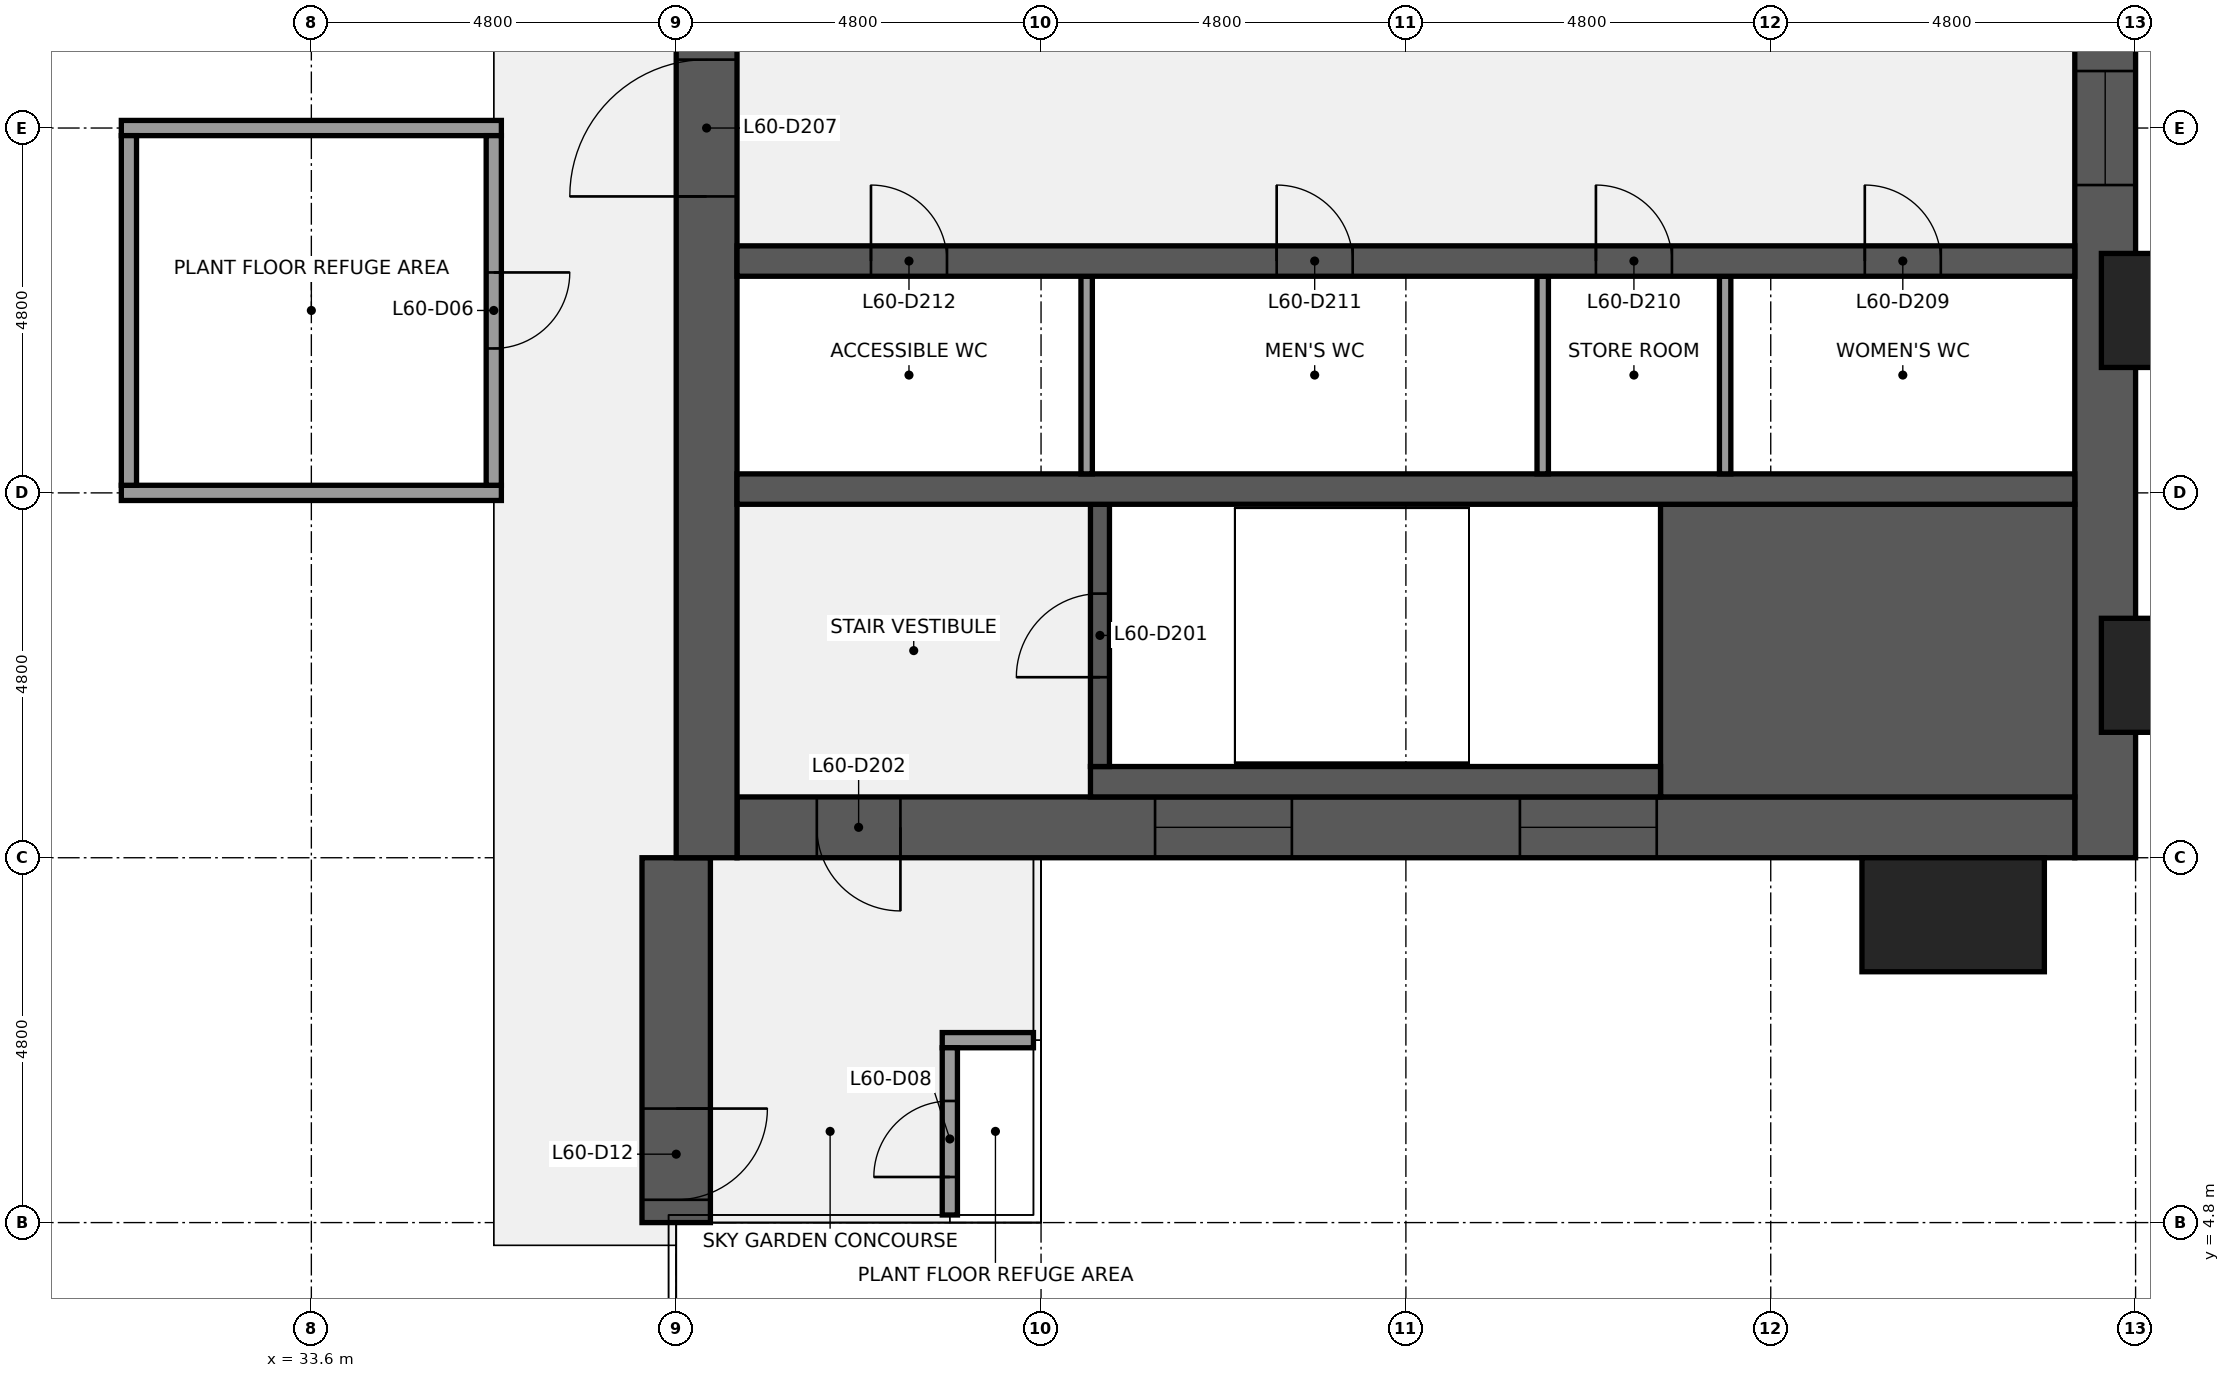
"""IFC4 building model, lengths in metres.
Left out: names, types, materials, properties, quantities, classifications, styles, units other than length and angle.
Written with IfcOpenShell. Run it as: python <this file> out.ifc"""

import sys

from ifc_helpers import new_model, si_unit, direction, frame, frame_2d, origin, origin_2d, place, context, subcontext, project, spatial, rectangle, extrude, element, fill, save


model = new_model("IFC4")
c1 = context("Model", 3, precision=1e-05, world=origin(), true_north=direction((0.0, 1.0)))
c2 = subcontext(c1, "Body", "Model", "MODEL_VIEW")
j1 = project(units=[si_unit("LENGTHUNIT", "METRE"), si_unit("PLANEANGLEUNIT", "RADIAN")], contexts=[c1])
p1 = place(None, origin())
s1 = spatial("IfcSite", under=j1, at=p1, CompositionType="ELEMENT")
p2 = place(p1, origin())
s2 = spatial("IfcBuilding", under=s1, at=p2, CompositionType="ELEMENT")
p3 = place(p2, frame((0.0, 0.0, 269.7)))
s3 = spatial("IfcBuildingStorey", under=s2, at=p3, CompositionType="ELEMENT", Elevation=269.7)
p4 = place(p3, frame((38.4, 4.8, 0.0), z_axis=(0.0, 0.0, 1.0), x_axis=(0.0, 1.0, 0.0)))
e1 = element("IfcWall", 1, at=p4, inside=s3, PredefinedType="SHEAR", context=c2, shape_type="SweptSolid", body=[
    extrude(rectangle(XDim=4.8, YDim=0.9, at=frame_2d((2.4, 0.0))), origin(), (0.0, 0.0, 1.0), 12.3),
])
p5 = place(p4, frame((0.3, 0.0, 0.0)))
e2 = element("IfcOpeningElement", 2, at=p5, cuts=e1, PredefinedType="OPENING", context=c2, shape_type="SweptSolid", body=[
    extrude(rectangle(XDim=1.2, YDim=2.1, at=frame_2d((0.6, 1.05))), frame((0.0, 0.46, 0.0), z_axis=(0.0, -1.0, 0.0), x_axis=(1.0, 0.0, 0.0)), (0.0, 0.0, 1.0), 0.92),
])
p6 = place(p3, frame((57.2, 38.4, 0.0), z_axis=(0.0, 0.0, 1.0), x_axis=(0.0, -1.0, 0.0)))
e3 = element("IfcWall", 3, at=p6, inside=s3, PredefinedType="SHEAR", context=c2, shape_type="SweptSolid", body=[
    extrude(rectangle(XDim=28.8, YDim=0.8, at=frame_2d((14.4, 0.0))), origin(), (0.0, 0.0, 1.0), 12.3),
])
p7 = place(p6, frame((18.45, 0.0, 0.9)))
e4 = element("IfcOpeningElement", 4, at=p7, cuts=e3, PredefinedType="OPENING", context=c2, shape_type="SweptSolid", body=[
    extrude(rectangle(XDim=1.5, YDim=6.3, at=frame_2d((0.75, 3.15))), frame((0.0, 0.41, 0.0), z_axis=(0.0, -1.0, 0.0), x_axis=(1.0, 0.0, 0.0)), (0.0, 0.0, 1.0), 0.82),
])
p8 = place(p6, frame((8.85, 0.0, 0.9)))
e5 = element("IfcOpeningElement", 5, at=p8, cuts=e3, PredefinedType="OPENING", context=c2, shape_type="SweptSolid", body=[
    extrude(rectangle(XDim=1.5, YDim=6.3, at=frame_2d((0.75, 3.15))), frame((0.0, 0.41, 0.0), z_axis=(0.0, -1.0, 0.0), x_axis=(1.0, 0.0, 0.0)), (0.0, 0.0, 1.0), 0.82),
])
p9 = place(p3, frame((56.8, 10.0, 0.0), z_axis=(0.0, 0.0, 1.0), x_axis=(-1.0, 0.0, 0.0)))
e6 = element("IfcWall", 6, at=p9, inside=s3, PredefinedType="SHEAR", context=c2, shape_type="SweptSolid", body=[
    extrude(rectangle(XDim=17.6, YDim=0.8, at=frame_2d((8.8, 0.0))), origin(), (0.0, 0.0, 1.0), 12.3),
])
p10 = place(p9, frame((15.45, 0.0, 0.0)))
e7 = element("IfcOpeningElement", 7, at=p10, cuts=e6, PredefinedType="OPENING", context=c2, shape_type="SweptSolid", body=[
    extrude(rectangle(XDim=1.1, YDim=2.1, at=frame_2d((0.55, 1.05))), frame((0.0, 0.41, 0.0), z_axis=(0.0, -1.0, 0.0), x_axis=(1.0, 0.0, 0.0)), (0.0, 0.0, 1.0), 0.82),
])
p11 = place(p9, frame((5.5, 0.0, 0.9)))
e8 = element("IfcOpeningElement", 8, at=p11, cuts=e6, PredefinedType="OPENING", context=c2, shape_type="SweptSolid", body=[
    extrude(rectangle(XDim=1.8, YDim=1.5, at=frame_2d((0.9, 0.75))), frame((0.0, 0.41, 0.0), z_axis=(0.0, -1.0, 0.0), x_axis=(1.0, 0.0, 0.0)), (0.0, 0.0, 1.0), 0.82),
])
p12 = place(p9, frame((10.3, 0.0, 0.9)))
e9 = element("IfcOpeningElement", 9, at=p12, cuts=e6, PredefinedType="OPENING", context=c2, shape_type="SweptSolid", body=[
    extrude(rectangle(XDim=1.8, YDim=1.5, at=frame_2d((0.9, 0.75))), frame((0.0, 0.41, 0.0), z_axis=(0.0, -1.0, 0.0), x_axis=(1.0, 0.0, 0.0)), (0.0, 0.0, 1.0), 0.82),
])
p13 = place(p3, frame((38.8, 9.6, 0.0), z_axis=(0.0, 0.0, 1.0), x_axis=(0.0, 1.0, 0.0)))
e10 = element("IfcWall", 10, at=p13, inside=s3, PredefinedType="SHEAR", context=c2, shape_type="SweptSolid", body=[
    extrude(rectangle(XDim=28.8, YDim=0.8, at=frame_2d((14.4, 0.0))), origin(), (0.0, 0.0, 1.0), 12.3),
])
p14 = place(p13, frame((8.7, 0.0, 0.0)))
e11 = element("IfcOpeningElement", 11, at=p14, cuts=e10, PredefinedType="OPENING", context=c2, shape_type="SweptSolid", body=[
    extrude(rectangle(XDim=1.8, YDim=2.1, at=frame_2d((0.9, 1.05))), frame((0.0, 0.41, 0.0), z_axis=(0.0, -1.0, 0.0), x_axis=(1.0, 0.0, 0.0)), (0.0, 0.0, 1.0), 0.82),
])
p15 = place(p13, frame((18.3, 0.0, 0.0)))
e12 = element("IfcOpeningElement", 12, at=p15, cuts=e10, PredefinedType="OPENING", context=c2, shape_type="SweptSolid", body=[
    extrude(rectangle(XDim=1.8, YDim=2.1, at=frame_2d((0.9, 1.05))), frame((0.0, 0.41, 0.0), z_axis=(0.0, -1.0, 0.0), x_axis=(1.0, 0.0, 0.0)), (0.0, 0.0, 1.0), 0.82),
])
p16 = place(p3, frame((51.35, 12.325, 0.0), z_axis=(0.0, 0.0, 1.0), x_axis=(1.0, 0.0, 0.0)))
e13 = element("IfcWall", 13, at=p16, inside=s3, PredefinedType="SHEAR", context=c2, shape_type="SweptSolid", body=[
    extrude(rectangle(XDim=5.45, YDim=3.85, at=frame_2d((2.725, 0.0))), origin(), (0.0, 0.0, 1.0), 12.3),
])
p17 = place(p3, frame((43.85, 10.6, 0.0), z_axis=(0.0, 0.0, 1.0), x_axis=(1.0, 0.0, 0.0)))
e14 = element("IfcWall", 14, at=p17, inside=s3, PredefinedType="SHEAR", context=c2, shape_type="SweptSolid", body=[
    extrude(rectangle(XDim=7.5, YDim=0.4, at=frame_2d((3.75, 0.0))), origin(), (0.0, 0.0, 1.0), 12.3),
])
p18 = place(p3, frame((43.975, 10.8, 0.0), z_axis=(0.0, 0.0, 1.0), x_axis=(0.0, 1.0, 0.0)))
e15 = element("IfcWall", 15, at=p18, inside=s3, PredefinedType="SHEAR", context=c2, shape_type="SweptSolid", body=[
    extrude(rectangle(XDim=3.45, YDim=0.25, at=frame_2d((1.725, 0.0))), origin(), (0.0, 0.0, 1.0), 12.3),
])
p19 = place(p18, frame((1.175, 0.0, 0.0)))
e16 = element("IfcOpeningElement", 16, at=p19, cuts=e15, PredefinedType="OPENING", context=c2, shape_type="SweptSolid", body=[
    extrude(rectangle(XDim=1.1, YDim=2.1, at=frame_2d((0.55, 1.05))), frame((0.0, 0.135, 0.0), z_axis=(0.0, -1.0, 0.0), x_axis=(1.0, 0.0, 0.0)), (0.0, 0.0, 1.0), 0.27),
])
p20 = place(p3, frame((39.2, 14.45, 0.0), z_axis=(0.0, 0.0, 1.0), x_axis=(1.0, 0.0, 0.0)))
e17 = element("IfcWall", 17, at=p20, inside=s3, PredefinedType="SHEAR", context=c2, shape_type="SweptSolid", body=[
    extrude(rectangle(XDim=17.6, YDim=0.4, at=frame_2d((8.8, 0.0))), origin(), (0.0, 0.0, 1.0), 12.3),
])
for number, where, z_axis, x_axis in (
    (18, (52.2, 14.65, 0.0), (0.0, 0.0, 1.0), (0.0, 1.0, 0.0)),
    (19, (49.8, 14.65, 0.0), (0.0, 0.0, 1.0), (0.0, 1.0, 0.0)),
    (20, (43.8, 14.65, 0.0), (0.0, 0.0, 1.0), (0.0, 1.0, 0.0)),
):
    element("IfcWall", number, at=place(p3, frame(where, z_axis=z_axis, x_axis=x_axis)), inside=s3, PredefinedType="PARTITIONING", context=c2, shape_type="SweptSolid", body=[
        extrude(rectangle(XDim=2.6, YDim=0.15, at=frame_2d((1.3, 0.0))), origin(), (0.0, 0.0, 1.0), 12.3),
    ])
p21 = place(p3, frame((39.2, 17.45, 0.0), z_axis=(0.0, 0.0, 1.0), x_axis=(1.0, 0.0, 0.0)))
e21 = element("IfcWall", 21, at=p21, inside=s3, PredefinedType="SHEAR", context=c2, shape_type="SweptSolid", body=[
    extrude(rectangle(XDim=17.6, YDim=0.4, at=frame_2d((8.8, 0.0))), origin(), (0.0, 0.0, 1.0), 12.3),
])
p22 = place(p21, frame((14.837, 0.0, 0.0)))
e22 = element("IfcOpeningElement", 22, at=p22, cuts=e21, PredefinedType="OPENING", context=c2, shape_type="SweptSolid", body=[
    extrude(rectangle(XDim=1.0, YDim=2.1, at=frame_2d((0.5, 1.05))), frame((0.0, 0.21, 0.0), z_axis=(0.0, -1.0, 0.0), x_axis=(1.0, 0.0, 0.0)), (0.0, 0.0, 1.0), 0.42),
])
p23 = place(p21, frame((11.3, 0.0, 0.0)))
e23 = element("IfcOpeningElement", 23, at=p23, cuts=e21, PredefinedType="OPENING", context=c2, shape_type="SweptSolid", body=[
    extrude(rectangle(XDim=1.0, YDim=2.1, at=frame_2d((0.5, 1.05))), frame((0.0, 0.21, 0.0), z_axis=(0.0, -1.0, 0.0), x_axis=(1.0, 0.0, 0.0)), (0.0, 0.0, 1.0), 0.42),
])
p24 = place(p21, frame((7.1, 0.0, 0.0)))
e24 = element("IfcOpeningElement", 24, at=p24, cuts=e21, PredefinedType="OPENING", context=c2, shape_type="SweptSolid", body=[
    extrude(rectangle(XDim=1.0, YDim=2.1, at=frame_2d((0.5, 1.05))), frame((0.0, 0.21, 0.0), z_axis=(0.0, -1.0, 0.0), x_axis=(1.0, 0.0, 0.0)), (0.0, 0.0, 1.0), 0.42),
])
p25 = place(p21, frame((1.762, 0.0, 0.0)))
e25 = element("IfcOpeningElement", 25, at=p25, cuts=e21, PredefinedType="OPENING", context=c2, shape_type="SweptSolid", body=[
    extrude(rectangle(XDim=1.0, YDim=2.1, at=frame_2d((0.5, 1.05))), frame((0.0, 0.21, 0.0), z_axis=(0.0, -1.0, 0.0), x_axis=(1.0, 0.0, 0.0)), (0.0, 0.0, 1.0), 0.42),
])
p26 = place(p3, frame((41.9, 7.2, 0.0), z_axis=(0.0, 0.0, 1.0), x_axis=(1.0, 0.0, 0.0)))
e26 = element("IfcWall", 26, at=p26, inside=s3, PredefinedType="PARTITIONING", context=c2, shape_type="SweptSolid", body=[
    extrude(rectangle(XDim=1.2, YDim=0.2, at=frame_2d((0.6, 0.0))), origin(), (0.0, 0.0, 1.0), 11.31),
])
for number, where, z_axis, x_axis in (
    (27, (31.1, 14.4, 0.0), (0.0, 0.0, 1.0), (1.0, 0.0, 0.0)),
    (28, (31.1, 19.2, 0.0), (0.0, 0.0, 1.0), (1.0, 0.0, 0.0)),
):
    element("IfcWall", number, at=place(p3, frame(where, z_axis=z_axis, x_axis=x_axis)), inside=s3, PredefinedType="PARTITIONING", context=c2, shape_type="SweptSolid", body=[
        extrude(rectangle(XDim=5.0, YDim=0.2, at=frame_2d((2.5, 0.0))), origin(), (0.0, 0.0, 1.0), 11.31),
    ])
p27 = place(p3, frame((31.2, 14.5, 0.0), z_axis=(0.0, 0.0, 1.0), x_axis=(0.0, 1.0, 0.0)))
e29 = element("IfcWall", 29, at=p27, inside=s3, PredefinedType="PARTITIONING", context=c2, shape_type="SweptSolid", body=[
    extrude(rectangle(XDim=4.6, YDim=0.2, at=frame_2d((2.3, 0.0))), origin(), (0.0, 0.0, 1.0), 11.31),
])
p28 = place(p3, frame((36.0, 14.5, 0.0), z_axis=(0.0, 0.0, 1.0), x_axis=(0.0, 1.0, 0.0)))
e30 = element("IfcWall", 30, at=p28, inside=s3, PredefinedType="PARTITIONING", context=c2, shape_type="SweptSolid", body=[
    extrude(rectangle(XDim=4.6, YDim=0.2, at=frame_2d((2.3, 0.0))), origin(), (0.0, 0.0, 1.0), 11.31),
])
p29 = place(p28, frame((1.8, 0.0, 0.0)))
e31 = element("IfcOpeningElement", 31, at=p29, cuts=e30, PredefinedType="OPENING", context=c2, shape_type="SweptSolid", body=[
    extrude(rectangle(XDim=1.0, YDim=2.1, at=frame_2d((0.5, 1.05))), frame((0.0, 0.11, 0.0), z_axis=(0.0, -1.0, 0.0), x_axis=(1.0, 0.0, 0.0)), (0.0, 0.0, 1.0), 0.22),
])
p30 = place(p3, frame((42.0, 4.9, 0.0), z_axis=(0.0, 0.0, 1.0), x_axis=(0.0, 1.0, 0.0)))
e32 = element("IfcWall", 32, at=p30, inside=s3, PredefinedType="PARTITIONING", context=c2, shape_type="SweptSolid", body=[
    extrude(rectangle(XDim=2.2, YDim=0.2, at=frame_2d((1.1, 0.0))), origin(), (0.0, 0.0, 1.0), 11.31),
])
p31 = place(p30, frame((0.5, 0.0, 0.0)))
e33 = element("IfcOpeningElement", 33, at=p31, cuts=e32, PredefinedType="OPENING", context=c2, shape_type="SweptSolid", body=[
    extrude(rectangle(XDim=1.0, YDim=2.1, at=frame_2d((0.5, 1.05))), frame((0.0, 0.11, 0.0), z_axis=(0.0, -1.0, 0.0), x_axis=(1.0, 0.0, 0.0)), (0.0, 0.0, 1.0), 0.22),
])
for number, where, z_axis, x_axis in (
    (34, (55.2, 8.85, 0.0), (0.0, 0.0, 1.0), (1.0, 0.0, 0.0)),
    (35, (58.35, 12.0, 0.0), (0.0, 0.0, 1.0), (0.0, 1.0, 0.0)),
    (36, (58.35, 16.8, 0.0), (0.0, 0.0, 1.0), (0.0, 1.0, 0.0)),
):
    element("IfcColumn", number, at=place(p3, frame(where, z_axis=z_axis, x_axis=x_axis)), inside=s3, PredefinedType="PILASTER", context=c2, shape_type="SweptSolid", body=[
        extrude(rectangle(XDim=2.4, YDim=1.5, at=origin_2d()), origin(), (0.0, 0.0, 1.0), 12.6),
    ])
p32 = place(p19, origin())
e37 = element("IfcDoor", 37, at=p32, inside=s3, OperationType="SINGLE_SWING_LEFT", PredefinedType="DOOR", context=c2, shape_type="SweptSolid", body=[
    extrude(rectangle(XDim=1.1, YDim=2.1, at=frame_2d((0.55, 1.05))), frame((0.0, 0.025, 0.0), z_axis=(0.0, -1.0, 0.0), x_axis=(1.0, 0.0, 0.0)), (0.0, 0.0, 1.0), 0.05),
])
fill(e16, e37)
p33 = place(p10, origin())
e38 = element("IfcDoor", 38, at=p33, inside=s3, OperationType="SINGLE_SWING_LEFT", PredefinedType="DOOR", context=c2, shape_type="SweptSolid", body=[
    extrude(rectangle(XDim=1.1, YDim=2.1, at=frame_2d((0.55, 1.05))), frame((0.0, 0.025, 0.0), z_axis=(0.0, -1.0, 0.0), x_axis=(1.0, 0.0, 0.0)), (0.0, 0.0, 1.0), 0.05),
])
fill(e7, e38)
p34 = place(p14, origin())
e39 = element("IfcDoor", 39, at=p34, inside=s3, OperationType="DOUBLE_DOOR_SINGLE_SWING", PredefinedType="DOOR", context=c2, shape_type="SweptSolid", body=[
    extrude(rectangle(XDim=1.8, YDim=2.1, at=frame_2d((0.9, 1.05))), frame((0.0, 0.025, 0.0), z_axis=(0.0, -1.0, 0.0), x_axis=(1.0, 0.0, 0.0)), (0.0, 0.0, 1.0), 0.05),
])
fill(e11, e39)
p35 = place(p22, origin())
e40 = element("IfcDoor", 40, at=p35, inside=s3, OperationType="SINGLE_SWING_LEFT", PredefinedType="DOOR", context=c2, shape_type="SweptSolid", body=[
    extrude(rectangle(XDim=1.0, YDim=2.1, at=frame_2d((0.5, 1.05))), frame((0.0, 0.025, 0.0), z_axis=(0.0, -1.0, 0.0), x_axis=(1.0, 0.0, 0.0)), (0.0, 0.0, 1.0), 0.05),
])
fill(e22, e40)
p36 = place(p23, origin())
e41 = element("IfcDoor", 41, at=p36, inside=s3, OperationType="SINGLE_SWING_LEFT", PredefinedType="DOOR", context=c2, shape_type="SweptSolid", body=[
    extrude(rectangle(XDim=1.0, YDim=2.1, at=frame_2d((0.5, 1.05))), frame((0.0, 0.025, 0.0), z_axis=(0.0, -1.0, 0.0), x_axis=(1.0, 0.0, 0.0)), (0.0, 0.0, 1.0), 0.05),
])
fill(e23, e41)
p37 = place(p24, origin())
e42 = element("IfcDoor", 42, at=p37, inside=s3, OperationType="SINGLE_SWING_LEFT", PredefinedType="DOOR", context=c2, shape_type="SweptSolid", body=[
    extrude(rectangle(XDim=1.0, YDim=2.1, at=frame_2d((0.5, 1.05))), frame((0.0, 0.025, 0.0), z_axis=(0.0, -1.0, 0.0), x_axis=(1.0, 0.0, 0.0)), (0.0, 0.0, 1.0), 0.05),
])
fill(e24, e42)
p38 = place(p25, origin())
e43 = element("IfcDoor", 43, at=p38, inside=s3, OperationType="SINGLE_SWING_LEFT", PredefinedType="DOOR", context=c2, shape_type="SweptSolid", body=[
    extrude(rectangle(XDim=1.0, YDim=2.1, at=frame_2d((0.5, 1.05))), frame((0.0, 0.025, 0.0), z_axis=(0.0, -1.0, 0.0), x_axis=(1.0, 0.0, 0.0)), (0.0, 0.0, 1.0), 0.05),
])
fill(e25, e43)
p39 = place(p7, origin())
e44 = element("IfcWindow", 44, at=p39, inside=s3, PartitioningType="SINGLE_PANEL", PredefinedType="WINDOW", context=c2, shape_type="SweptSolid", body=[
    extrude(rectangle(XDim=1.5, YDim=6.3, at=frame_2d((0.75, 3.15))), frame((0.0, 0.03, 0.0), z_axis=(0.0, -1.0, 0.0), x_axis=(1.0, 0.0, 0.0)), (0.0, 0.0, 1.0), 0.06),
])
fill(e4, e44)
p40 = place(p11, origin())
e45 = element("IfcWindow", 45, at=p40, inside=s3, PartitioningType="SINGLE_PANEL", PredefinedType="WINDOW", context=c2, shape_type="SweptSolid", body=[
    extrude(rectangle(XDim=1.8, YDim=1.5, at=frame_2d((0.9, 0.75))), frame((0.0, 0.03, 0.0), z_axis=(0.0, -1.0, 0.0), x_axis=(1.0, 0.0, 0.0)), (0.0, 0.0, 1.0), 0.06),
])
fill(e8, e45)
p41 = place(p12, origin())
e46 = element("IfcWindow", 46, at=p41, inside=s3, PartitioningType="SINGLE_PANEL", PredefinedType="WINDOW", context=c2, shape_type="SweptSolid", body=[
    extrude(rectangle(XDim=1.8, YDim=1.5, at=frame_2d((0.9, 0.75))), frame((0.0, 0.03, 0.0), z_axis=(0.0, -1.0, 0.0), x_axis=(1.0, 0.0, 0.0)), (0.0, 0.0, 1.0), 0.06),
])
fill(e9, e46)
p42 = place(p29, origin())
e47 = element("IfcDoor", 47, at=p42, inside=s3, OperationType="SINGLE_SWING_RIGHT", PredefinedType="DOOR", context=c2, shape_type="SweptSolid", body=[
    extrude(rectangle(XDim=1.0, YDim=2.1, at=frame_2d((0.5, 1.05))), frame((0.0, 0.025, 0.0), z_axis=(0.0, -1.0, 0.0), x_axis=(1.0, 0.0, 0.0)), (0.0, 0.0, 1.0), 0.05),
])
fill(e31, e47)
p43 = place(p31, origin())
e48 = element("IfcDoor", 48, at=p43, inside=s3, OperationType="SINGLE_SWING_LEFT", PredefinedType="DOOR", context=c2, shape_type="SweptSolid", body=[
    extrude(rectangle(XDim=1.0, YDim=2.1, at=frame_2d((0.5, 1.05))), frame((0.0, 0.025, 0.0), z_axis=(0.0, -1.0, 0.0), x_axis=(1.0, 0.0, 0.0)), (0.0, 0.0, 1.0), 0.05),
])
fill(e33, e48)
p44 = place(p5, origin())
e49 = element("IfcDoor", 49, at=p44, inside=s3, OperationType="SINGLE_SWING_RIGHT", PredefinedType="DOOR", context=c2, shape_type="SweptSolid", body=[
    extrude(rectangle(XDim=1.2, YDim=2.1, at=frame_2d((0.6, 1.05))), frame((0.0, 0.025, 0.0), z_axis=(0.0, -1.0, 0.0), x_axis=(1.0, 0.0, 0.0)), (0.0, 0.0, 1.0), 0.05),
])
fill(e2, e49)
save(model, sys.argv[1])
